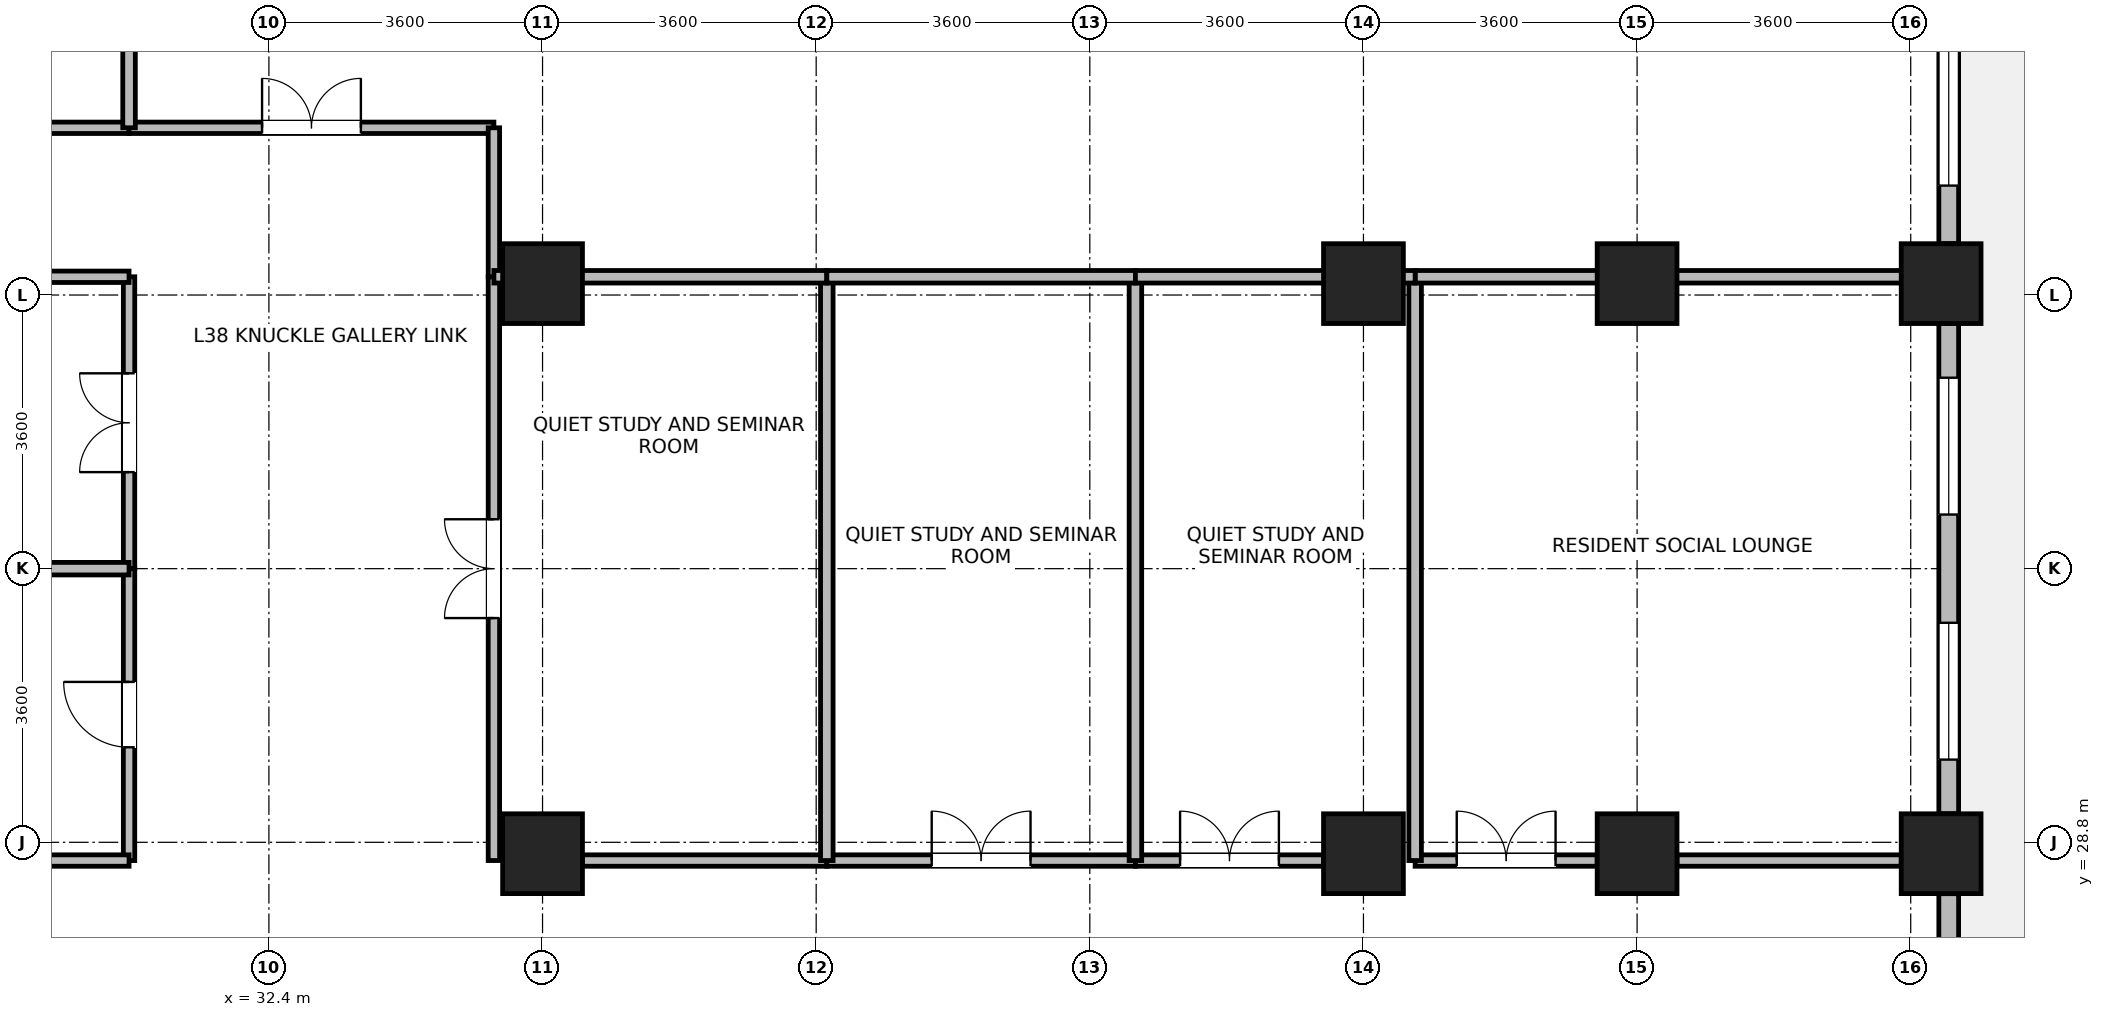
"""IFC4 building model, lengths in metres.
Left out: names, types, materials, properties, quantities, classifications, styles, units other than length and angle.
Written with IfcOpenShell. Run it as: python <this file> out.ifc"""

import sys

from ifc_helpers import new_model, si_unit, direction, frame, frame_2d, origin, origin_2d, place, context, subcontext, project, spatial, rectangle, extrude, source, transform, mapped, element, fill, save


model = new_model("IFC4")
c1 = context("Model", 3, precision=1e-05, world=origin(), true_north=direction((0.0, 1.0)))
c2 = subcontext(c1, "Body", "Model", "MODEL_VIEW")
j1 = project(units=[si_unit("LENGTHUNIT", "METRE"), si_unit("PLANEANGLEUNIT", "RADIAN")], contexts=[c1])
p1 = place(None, origin())
s1 = spatial("IfcSite", under=j1, at=p1, CompositionType="ELEMENT")
p2 = place(p1, origin())
s2 = spatial("IfcBuilding", under=s1, at=p2, CompositionType="ELEMENT")
p3 = place(p2, frame((0.0, 0.0, 151.3)))
s3 = spatial("IfcBuildingStorey", under=s2, at=p3, CompositionType="ELEMENT", Elevation=151.3)
m1 = source(origin(), c2, "Body", "SweptSolid", [
    extrude(rectangle(XDim=1.05, YDim=1.05, at=origin_2d()), origin(), (0.0, 0.0, 1.0), 3.7),
])
for number, where, z_axis, x_axis in (
    (1, (36.0, 28.65, 0.0), (0.0, 0.0, 1.0), (1.0, 0.0, 0.0)),
    (2, (36.0, 36.15, 0.0), (0.0, 0.0, 1.0), (1.0, 0.0, 0.0)),
    (3, (46.8, 28.65, 0.0), (0.0, 0.0, 1.0), (1.0, 0.0, 0.0)),
    (4, (46.8, 36.15, 0.0), (0.0, 0.0, 1.0), (1.0, 0.0, 0.0)),
    (5, (50.4, 28.65, 0.0), (0.0, 0.0, 1.0), (1.0, 0.0, 0.0)),
    (6, (50.4, 36.15, 0.0), (0.0, 0.0, 1.0), (1.0, 0.0, 0.0)),
    (7, (54.4, 28.65, 0.0), (0.0, 0.0, 1.0), (1.0, 0.0, 0.0)),
    (8, (54.4, 36.15, 0.0), (0.0, 0.0, 1.0), (1.0, 0.0, 0.0)),
):
    element("IfcColumn", number, at=place(p3, frame(where, z_axis=z_axis, x_axis=x_axis)), inside=s3, PredefinedType="COLUMN", context=c2, shape_type="MappedRepresentation", body=[
        mapped(m1, transform((0.0, 0.0, 0.0), x_axis=(1.0, 0.0, 0.0), y_axis=(0.0, 1.0, 0.0), z_axis=(0.0, 0.0, 1.0), scale=1.0)),
    ])
p4 = place(p3, frame((54.5, 28.124, 0.0), z_axis=(0.0, 0.0, 1.0), x_axis=(0.0, -1.0, 0.0)))
e9 = element("IfcWall", 9, at=p4, inside=s3, PredefinedType="STANDARD", context=c2, shape_type="SweptSolid", body=[
    extrude(rectangle(XDim=5.998, YDim=0.26, at=frame_2d((2.999, 0.0))), origin(), (0.0, 0.0, 1.0), 2.99),
])
p5 = place(p4, frame((3.598, 0.0, 0.85)))
e10 = element("IfcOpeningElement", 10, at=p5, cuts=e9, PredefinedType="OPENING", context=c2, shape_type="SweptSolid", body=[
    extrude(rectangle(XDim=1.8, YDim=1.85, at=frame_2d((0.9, 0.925))), frame((0.0, 0.14, 0.0), z_axis=(0.0, -1.0, 0.0), x_axis=(1.0, 0.0, 0.0)), (0.0, 0.0, 1.0), 0.28),
])
p6 = place(p4, frame((2.044, 0.0, 0.85)))
e11 = element("IfcOpeningElement", 11, at=p6, cuts=e9, PredefinedType="OPENING", context=c2, shape_type="SweptSolid", body=[
    extrude(rectangle(XDim=0.95, YDim=1.75, at=frame_2d((0.475, 0.875))), frame((0.0, 0.14, 0.0), z_axis=(0.0, -1.0, 0.0), x_axis=(1.0, 0.0, 0.0)), (0.0, 0.0, 1.0), 0.28),
])
p7 = place(p3, frame((54.5, 35.624, 0.0), z_axis=(0.0, 0.0, 1.0), x_axis=(0.0, -1.0, 0.0)))
e12 = element("IfcWall", 12, at=p7, inside=s3, PredefinedType="STANDARD", context=c2, shape_type="SweptSolid", body=[
    extrude(rectangle(XDim=6.448, YDim=0.26, at=frame_2d((3.224, 0.0))), origin(), (0.0, 0.0, 1.0), 2.99),
])
p8 = place(p7, frame((0.712, 0.0, 0.85)))
e13 = element("IfcOpeningElement", 13, at=p8, cuts=e12, PredefinedType="OPENING", context=c2, shape_type="SweptSolid", body=[
    extrude(rectangle(XDim=1.8, YDim=1.85, at=frame_2d((0.9, 0.925))), frame((0.0, 0.14, 0.0), z_axis=(0.0, -1.0, 0.0), x_axis=(1.0, 0.0, 0.0)), (0.0, 0.0, 1.0), 0.28),
])
p9 = place(p7, frame((3.936, 0.0, 0.85)))
e14 = element("IfcOpeningElement", 14, at=p9, cuts=e12, PredefinedType="OPENING", context=c2, shape_type="SweptSolid", body=[
    extrude(rectangle(XDim=1.8, YDim=1.85, at=frame_2d((0.9, 0.925))), frame((0.0, 0.14, 0.0), z_axis=(0.0, -1.0, 0.0), x_axis=(1.0, 0.0, 0.0)), (0.0, 0.0, 1.0), 0.28),
])
p10 = place(p3, frame((54.5, 43.33, 0.0), z_axis=(0.0, 0.0, 1.0), x_axis=(0.0, -1.0, 0.0)))
e15 = element("IfcWall", 15, at=p10, inside=s3, PredefinedType="STANDARD", context=c2, shape_type="SweptSolid", body=[
    extrude(rectangle(XDim=6.654, YDim=0.26, at=frame_2d((3.327, 0.0))), origin(), (0.0, 0.0, 1.0), 3.44),
])
p11 = place(p10, frame((0.763, 0.0, 0.85)))
e16 = element("IfcOpeningElement", 16, at=p11, cuts=e15, PredefinedType="OPENING", context=c2, shape_type="SweptSolid", body=[
    extrude(rectangle(XDim=1.8, YDim=1.85, at=frame_2d((0.9, 0.925))), frame((0.0, 0.14, 0.0), z_axis=(0.0, -1.0, 0.0), x_axis=(1.0, 0.0, 0.0)), (0.0, 0.0, 1.0), 0.28),
])
p12 = place(p10, frame((4.091, 0.0, 0.85)))
e17 = element("IfcOpeningElement", 17, at=p12, cuts=e15, PredefinedType="OPENING", context=c2, shape_type="SweptSolid", body=[
    extrude(rectangle(XDim=1.8, YDim=1.85, at=frame_2d((0.9, 0.925))), frame((0.0, 0.14, 0.0), z_axis=(0.0, -1.0, 0.0), x_axis=(1.0, 0.0, 0.0)), (0.0, 0.0, 1.0), 0.28),
])
p13 = place(p3, frame((35.36, 28.56, 0.0), z_axis=(0.0, 0.0, 1.0), x_axis=(0.0, 1.0, 0.0)))
e18 = element("IfcWall", 18, at=p13, inside=s3, PredefinedType="PARTITIONING", context=c2, shape_type="SweptSolid", body=[
    extrude(rectangle(XDim=7.68, YDim=0.15, at=frame_2d((3.84, 0.0))), origin(), (0.0, 0.0, 1.0), 3.44),
])
p14 = place(p13, frame((3.19, 0.0, 0.0)))
e19 = element("IfcOpeningElement", 19, at=p14, cuts=e18, PredefinedType="OPENING", context=c2, shape_type="SweptSolid", body=[
    extrude(rectangle(XDim=1.3, YDim=2.12, at=frame_2d((0.65, 1.06))), frame((0.0, 0.085, 0.0), z_axis=(0.0, -1.0, 0.0), x_axis=(1.0, 0.0, 0.0)), (0.0, 0.0, 1.0), 0.17),
])
p15 = place(p3, frame((23.48, 38.2, 0.0), z_axis=(0.0, 0.0, 1.0), x_axis=(1.0, 0.0, 0.0)))
e20 = element("IfcWall", 20, at=p15, inside=s3, PredefinedType="PARTITIONING", context=c2, shape_type="SweptSolid", body=[
    extrude(rectangle(XDim=7.08, YDim=0.15, at=frame_2d((3.54, 0.0))), origin(), (0.0, 0.0, 1.0), 3.44),
])
p16 = place(p15, frame((2.89, 0.0, 0.0)))
e21 = element("IfcOpeningElement", 21, at=p16, cuts=e20, PredefinedType="OPENING", context=c2, shape_type="SweptSolid", body=[
    extrude(rectangle(XDim=1.3, YDim=2.12, at=frame_2d((0.65, 1.06))), frame((0.0, 0.085, 0.0), z_axis=(0.0, -1.0, 0.0), x_axis=(1.0, 0.0, 0.0)), (0.0, 0.0, 1.0), 0.17),
])
p17 = place(p3, frame((47.48, 28.56, 0.0), z_axis=(0.0, 0.0, 1.0), x_axis=(1.0, 0.0, 0.0)))
e22 = element("IfcWall", 22, at=p17, inside=s3, PredefinedType="PARTITIONING", context=c2, shape_type="SweptSolid", body=[
    extrude(rectangle(XDim=2.395, YDim=0.15, at=frame_2d((1.198, 0.0))), origin(), (0.0, 0.0, 1.0), 2.84),
])
p18 = place(p17, frame((0.548, 0.0, 0.0)))
e23 = element("IfcOpeningElement", 23, at=p18, cuts=e22, PredefinedType="OPENING", context=c2, shape_type="SweptSolid", body=[
    extrude(rectangle(XDim=1.3, YDim=2.12, at=frame_2d((0.65, 1.06))), frame((0.0, 0.085, 0.0), z_axis=(0.0, -1.0, 0.0), x_axis=(1.0, 0.0, 0.0)), (0.0, 0.0, 1.0), 0.17),
])
p19 = place(p3, frame((50.925, 28.56, 0.0), z_axis=(0.0, 0.0, 1.0), x_axis=(1.0, 0.0, 0.0)))
e24 = element("IfcWall", 24, at=p19, inside=s3, PredefinedType="PARTITIONING", context=c2, shape_type="SweptSolid", body=[
    extrude(rectangle(XDim=2.95, YDim=0.15, at=frame_2d((1.475, 0.0))), origin(), (0.0, 0.0, 1.0), 2.84),
])
p20 = place(p3, frame((30.56, 38.2, 0.0), z_axis=(0.0, 0.0, 1.0), x_axis=(1.0, 0.0, 0.0)))
e25 = element("IfcWall", 25, at=p20, inside=s3, PredefinedType="PARTITIONING", context=c2, shape_type="SweptSolid", body=[
    extrude(rectangle(XDim=4.8, YDim=0.15, at=frame_2d((2.4, 0.0))), origin(), (0.0, 0.0, 1.0), 3.44),
])
p21 = place(p20, frame((1.75, 0.0, 0.0)))
e26 = element("IfcOpeningElement", 26, at=p21, cuts=e25, PredefinedType="OPENING", context=c2, shape_type="SweptSolid", body=[
    extrude(rectangle(XDim=1.3, YDim=2.12, at=frame_2d((0.65, 1.06))), frame((0.0, 0.085, 0.0), z_axis=(0.0, -1.0, 0.0), x_axis=(1.0, 0.0, 0.0)), (0.0, 0.0, 1.0), 0.17),
])
p22 = place(p3, frame((36.525, 28.56, 0.0), z_axis=(0.0, 0.0, 1.0), x_axis=(1.0, 0.0, 0.0)))
e27 = element("IfcWall", 27, at=p22, inside=s3, PredefinedType="PARTITIONING", context=c2, shape_type="SweptSolid", body=[
    extrude(rectangle(XDim=3.215, YDim=0.15, at=frame_2d((1.607, 0.0))), origin(), (0.0, 0.0, 1.0), 2.84),
])
p23 = place(p3, frame((39.74, 28.56, 0.0), z_axis=(0.0, 0.0, 1.0), x_axis=(1.0, 0.0, 0.0)))
e28 = element("IfcWall", 28, at=p23, inside=s3, PredefinedType="PARTITIONING", context=c2, shape_type="SweptSolid", body=[
    extrude(rectangle(XDim=4.06, YDim=0.15, at=frame_2d((2.03, 0.0))), origin(), (0.0, 0.0, 1.0), 2.84),
])
p24 = place(p23, frame((1.38, 0.0, 0.0)))
e29 = element("IfcOpeningElement", 29, at=p24, cuts=e28, PredefinedType="OPENING", context=c2, shape_type="SweptSolid", body=[
    extrude(rectangle(XDim=1.3, YDim=2.12, at=frame_2d((0.65, 1.06))), frame((0.0, 0.085, 0.0), z_axis=(0.0, -1.0, 0.0), x_axis=(1.0, 0.0, 0.0)), (0.0, 0.0, 1.0), 0.17),
])
p25 = place(p3, frame((30.56, 32.4, 0.0), z_axis=(0.0, 0.0, 1.0), x_axis=(0.0, 1.0, 0.0)))
e30 = element("IfcWall", 30, at=p25, inside=s3, PredefinedType="PARTITIONING", context=c2, shape_type="SweptSolid", body=[
    extrude(rectangle(XDim=3.84, YDim=0.15, at=frame_2d((1.92, 0.0))), origin(), (0.0, 0.0, 1.0), 3.44),
])
p26 = place(p25, frame((1.27, 0.0, 0.0)))
e31 = element("IfcOpeningElement", 31, at=p26, cuts=e30, PredefinedType="OPENING", context=c2, shape_type="SweptSolid", body=[
    extrude(rectangle(XDim=1.3, YDim=2.12, at=frame_2d((0.65, 1.06))), frame((0.0, 0.085, 0.0), z_axis=(0.0, -1.0, 0.0), x_axis=(1.0, 0.0, 0.0)), (0.0, 0.0, 1.0), 0.17),
])
p27 = place(p3, frame((30.56, 28.56, 0.0), z_axis=(0.0, 0.0, 1.0), x_axis=(0.0, 1.0, 0.0)))
e32 = element("IfcWall", 32, at=p27, inside=s3, PredefinedType="PARTITIONING", context=c2, shape_type="SweptSolid", body=[
    extrude(rectangle(XDim=3.84, YDim=0.15, at=frame_2d((1.92, 0.0))), origin(), (0.0, 0.0, 1.0), 3.44),
])
p28 = place(p27, frame((1.49, 0.0, 0.0)))
e33 = element("IfcOpeningElement", 33, at=p28, cuts=e32, PredefinedType="OPENING", context=c2, shape_type="SweptSolid", body=[
    extrude(rectangle(XDim=0.86, YDim=2.02, at=frame_2d((0.43, 1.01))), frame((0.0, 0.085, 0.0), z_axis=(0.0, -1.0, 0.0), x_axis=(1.0, 0.0, 0.0)), (0.0, 0.0, 1.0), 0.17),
])
p29 = place(p3, frame((43.8, 28.56, 0.0), z_axis=(0.0, 0.0, 1.0), x_axis=(1.0, 0.0, 0.0)))
e34 = element("IfcWall", 34, at=p29, inside=s3, PredefinedType="PARTITIONING", context=c2, shape_type="SweptSolid", body=[
    extrude(rectangle(XDim=2.475, YDim=0.15, at=frame_2d((1.237, 0.0))), origin(), (0.0, 0.0, 1.0), 2.84),
])
p30 = place(p29, frame((0.587, 0.0, 0.0)))
e35 = element("IfcOpeningElement", 35, at=p30, cuts=e34, PredefinedType="OPENING", context=c2, shape_type="SweptSolid", body=[
    extrude(rectangle(XDim=1.3, YDim=2.12, at=frame_2d((0.65, 1.06))), frame((0.0, 0.085, 0.0), z_axis=(0.0, -1.0, 0.0), x_axis=(1.0, 0.0, 0.0)), (0.0, 0.0, 1.0), 0.17),
])
p31 = place(p3, frame((35.36, 36.24, 0.0), z_axis=(0.0, 0.0, 1.0), x_axis=(0.0, 1.0, 0.0)))
e36 = element("IfcWall", 36, at=p31, inside=s3, PredefinedType="PARTITIONING", context=c2, shape_type="SweptSolid", body=[
    extrude(rectangle(XDim=1.96, YDim=0.15, at=frame_2d((0.98, 0.0))), origin(), (0.0, 0.0, 1.0), 3.44),
])
for number, where, z_axis, x_axis in (
    (37, (29.325, 28.56, 0.0), (0.0, 0.0, 1.0), (1.0, 0.0, 0.0)),
    (38, (29.325, 36.24, 0.0), (0.0, 0.0, 1.0), (1.0, 0.0, 0.0)),
):
    element("IfcWall", number, at=place(p3, frame(where, z_axis=z_axis, x_axis=x_axis)), inside=s3, PredefinedType="PARTITIONING", context=c2, shape_type="SweptSolid", body=[
        extrude(rectangle(XDim=1.235, YDim=0.15, at=frame_2d((0.618, 0.0))), origin(), (0.0, 0.0, 1.0), 2.84),
    ])
for number, where, z_axis, x_axis in (
    (39, (39.74, 28.56, 0.0), (0.0, 0.0, 1.0), (0.0, 1.0, 0.0)),
    (40, (43.8, 28.56, 0.0), (0.0, 0.0, 1.0), (0.0, 1.0, 0.0)),
    (41, (47.48, 28.56, 0.0), (0.0, 0.0, 1.0), (0.0, 1.0, 0.0)),
):
    element("IfcWall", number, at=place(p3, frame(where, z_axis=z_axis, x_axis=x_axis)), inside=s3, PredefinedType="PARTITIONING", context=c2, shape_type="SweptSolid", body=[
        extrude(rectangle(XDim=7.68, YDim=0.165, at=frame_2d((3.84, 0.0))), origin(), (0.0, 0.0, 1.0), 3.44),
    ])
p32 = place(p3, frame((47.48, 36.24, 0.0), z_axis=(0.0, 0.0, 1.0), x_axis=(1.0, 0.0, 0.0)))
e42 = element("IfcWall", 42, at=p32, inside=s3, PredefinedType="PARTITIONING", context=c2, shape_type="SweptSolid", body=[
    extrude(rectangle(XDim=6.888, YDim=0.165, at=frame_2d((3.444, 0.0))), origin(), (0.0, 0.0, 1.0), 2.84),
])
p33 = place(p3, frame((30.56, 38.2, 0.0), z_axis=(0.0, 0.0, 1.0), x_axis=(0.0, 1.0, 0.0)))
e43 = element("IfcWall", 43, at=p33, inside=s3, PredefinedType="PARTITIONING", context=c2, shape_type="SweptSolid", body=[
    extrude(rectangle(XDim=4.868, YDim=0.165, at=frame_2d((2.434, 0.0))), origin(), (0.0, 0.0, 1.0), 3.44),
])
p34 = place(p3, frame((35.36, 36.24, 0.0), z_axis=(0.0, 0.0, 1.0), x_axis=(1.0, 0.0, 0.0)))
e44 = element("IfcWall", 44, at=p34, inside=s3, PredefinedType="PARTITIONING", context=c2, shape_type="SweptSolid", body=[
    extrude(rectangle(XDim=4.38, YDim=0.165, at=frame_2d((2.19, 0.0))), origin(), (0.0, 0.0, 1.0), 2.84),
])
p35 = place(p3, frame((39.74, 36.24, 0.0), z_axis=(0.0, 0.0, 1.0), x_axis=(1.0, 0.0, 0.0)))
e45 = element("IfcWall", 45, at=p35, inside=s3, PredefinedType="PARTITIONING", context=c2, shape_type="SweptSolid", body=[
    extrude(rectangle(XDim=4.06, YDim=0.165, at=frame_2d((2.03, 0.0))), origin(), (0.0, 0.0, 1.0), 2.84),
])
p36 = place(p3, frame((43.8, 36.24, 0.0), z_axis=(0.0, 0.0, 1.0), x_axis=(1.0, 0.0, 0.0)))
e46 = element("IfcWall", 46, at=p36, inside=s3, PredefinedType="PARTITIONING", context=c2, shape_type="SweptSolid", body=[
    extrude(rectangle(XDim=3.68, YDim=0.165, at=frame_2d((1.84, 0.0))), origin(), (0.0, 0.0, 1.0), 2.84),
])
p37 = place(p3, frame((28.84, 32.4, 0.0), z_axis=(0.0, 0.0, 1.0), x_axis=(1.0, 0.0, 0.0)))
e47 = element("IfcWall", 47, at=p37, inside=s3, PredefinedType="PARTITIONING", context=c2, shape_type="SweptSolid", body=[
    extrude(rectangle(XDim=1.72, YDim=0.165, at=frame_2d((0.86, 0.0))), origin(), (0.0, 0.0, 1.0), 3.44),
])
p38 = place(p8, origin())
e48 = element("IfcWindow", 48, at=p38, inside=s3, PartitioningType="SINGLE_PANEL", PredefinedType="WINDOW", context=c2, shape_type="SweptSolid", body=[
    extrude(rectangle(XDim=1.8, YDim=1.85, at=frame_2d((0.9, 0.925))), frame((0.0, 0.03, 0.0), z_axis=(0.0, -1.0, 0.0), x_axis=(1.0, 0.0, 0.0)), (0.0, 0.0, 1.0), 0.06),
])
fill(e13, e48)
p39 = place(p9, origin())
e49 = element("IfcWindow", 49, at=p39, inside=s3, PartitioningType="SINGLE_PANEL", PredefinedType="WINDOW", context=c2, shape_type="SweptSolid", body=[
    extrude(rectangle(XDim=1.8, YDim=1.85, at=frame_2d((0.9, 0.925))), frame((0.0, 0.03, 0.0), z_axis=(0.0, -1.0, 0.0), x_axis=(1.0, 0.0, 0.0)), (0.0, 0.0, 1.0), 0.06),
])
fill(e14, e49)
p40 = place(p12, origin())
e50 = element("IfcWindow", 50, at=p40, inside=s3, PartitioningType="SINGLE_PANEL", PredefinedType="WINDOW", context=c2, shape_type="SweptSolid", body=[
    extrude(rectangle(XDim=1.8, YDim=1.85, at=frame_2d((0.9, 0.925))), frame((0.0, 0.03, 0.0), z_axis=(0.0, -1.0, 0.0), x_axis=(1.0, 0.0, 0.0)), (0.0, 0.0, 1.0), 0.06),
])
fill(e17, e50)
p41 = place(p14, origin())
e51 = element("IfcDoor", 51, at=p41, inside=s3, OperationType="DOUBLE_DOOR_SINGLE_SWING", PredefinedType="DOOR", context=c2, shape_type="SweptSolid", body=[
    extrude(rectangle(XDim=1.3, YDim=2.12, at=frame_2d((0.65, 1.06))), frame((0.0, 0.025, 0.0), z_axis=(0.0, -1.0, 0.0), x_axis=(1.0, 0.0, 0.0)), (0.0, 0.0, 1.0), 0.05),
])
fill(e19, e51)
p42 = place(p18, origin())
e52 = element("IfcDoor", 52, at=p42, inside=s3, OperationType="DOUBLE_DOOR_SINGLE_SWING", PredefinedType="DOOR", context=c2, shape_type="SweptSolid", body=[
    extrude(rectangle(XDim=1.3, YDim=2.12, at=frame_2d((0.65, 1.06))), frame((0.0, 0.025, 0.0), z_axis=(0.0, -1.0, 0.0), x_axis=(1.0, 0.0, 0.0)), (0.0, 0.0, 1.0), 0.05),
])
fill(e23, e52)
p43 = place(p21, origin())
e53 = element("IfcDoor", 53, at=p43, inside=s3, OperationType="DOUBLE_DOOR_SINGLE_SWING", PredefinedType="DOOR", context=c2, shape_type="SweptSolid", body=[
    extrude(rectangle(XDim=1.3, YDim=2.12, at=frame_2d((0.65, 1.06))), frame((0.0, 0.025, 0.0), z_axis=(0.0, -1.0, 0.0), x_axis=(1.0, 0.0, 0.0)), (0.0, 0.0, 1.0), 0.05),
])
fill(e26, e53)
p44 = place(p24, origin())
e54 = element("IfcDoor", 54, at=p44, inside=s3, OperationType="DOUBLE_DOOR_SINGLE_SWING", PredefinedType="DOOR", context=c2, shape_type="SweptSolid", body=[
    extrude(rectangle(XDim=1.3, YDim=2.12, at=frame_2d((0.65, 1.06))), frame((0.0, 0.025, 0.0), z_axis=(0.0, -1.0, 0.0), x_axis=(1.0, 0.0, 0.0)), (0.0, 0.0, 1.0), 0.05),
])
fill(e29, e54)
p45 = place(p26, origin())
e55 = element("IfcDoor", 55, at=p45, inside=s3, OperationType="DOUBLE_DOOR_SINGLE_SWING", PredefinedType="DOOR", context=c2, shape_type="SweptSolid", body=[
    extrude(rectangle(XDim=1.3, YDim=2.12, at=frame_2d((0.65, 1.06))), frame((0.0, 0.025, 0.0), z_axis=(0.0, -1.0, 0.0), x_axis=(1.0, 0.0, 0.0)), (0.0, 0.0, 1.0), 0.05),
])
fill(e31, e55)
p46 = place(p28, origin())
e56 = element("IfcDoor", 56, at=p46, inside=s3, OperationType="SINGLE_SWING_RIGHT", PredefinedType="DOOR", context=c2, shape_type="SweptSolid", body=[
    extrude(rectangle(XDim=0.86, YDim=2.02, at=frame_2d((0.43, 1.01))), frame((0.0, 0.025, 0.0), z_axis=(0.0, -1.0, 0.0), x_axis=(1.0, 0.0, 0.0)), (0.0, 0.0, 1.0), 0.05),
])
fill(e33, e56)
p47 = place(p30, origin())
e57 = element("IfcDoor", 57, at=p47, inside=s3, OperationType="DOUBLE_DOOR_SINGLE_SWING", PredefinedType="DOOR", context=c2, shape_type="SweptSolid", body=[
    extrude(rectangle(XDim=1.3, YDim=2.12, at=frame_2d((0.65, 1.06))), frame((0.0, 0.025, 0.0), z_axis=(0.0, -1.0, 0.0), x_axis=(1.0, 0.0, 0.0)), (0.0, 0.0, 1.0), 0.05),
])
fill(e35, e57)
save(model, sys.argv[1])
